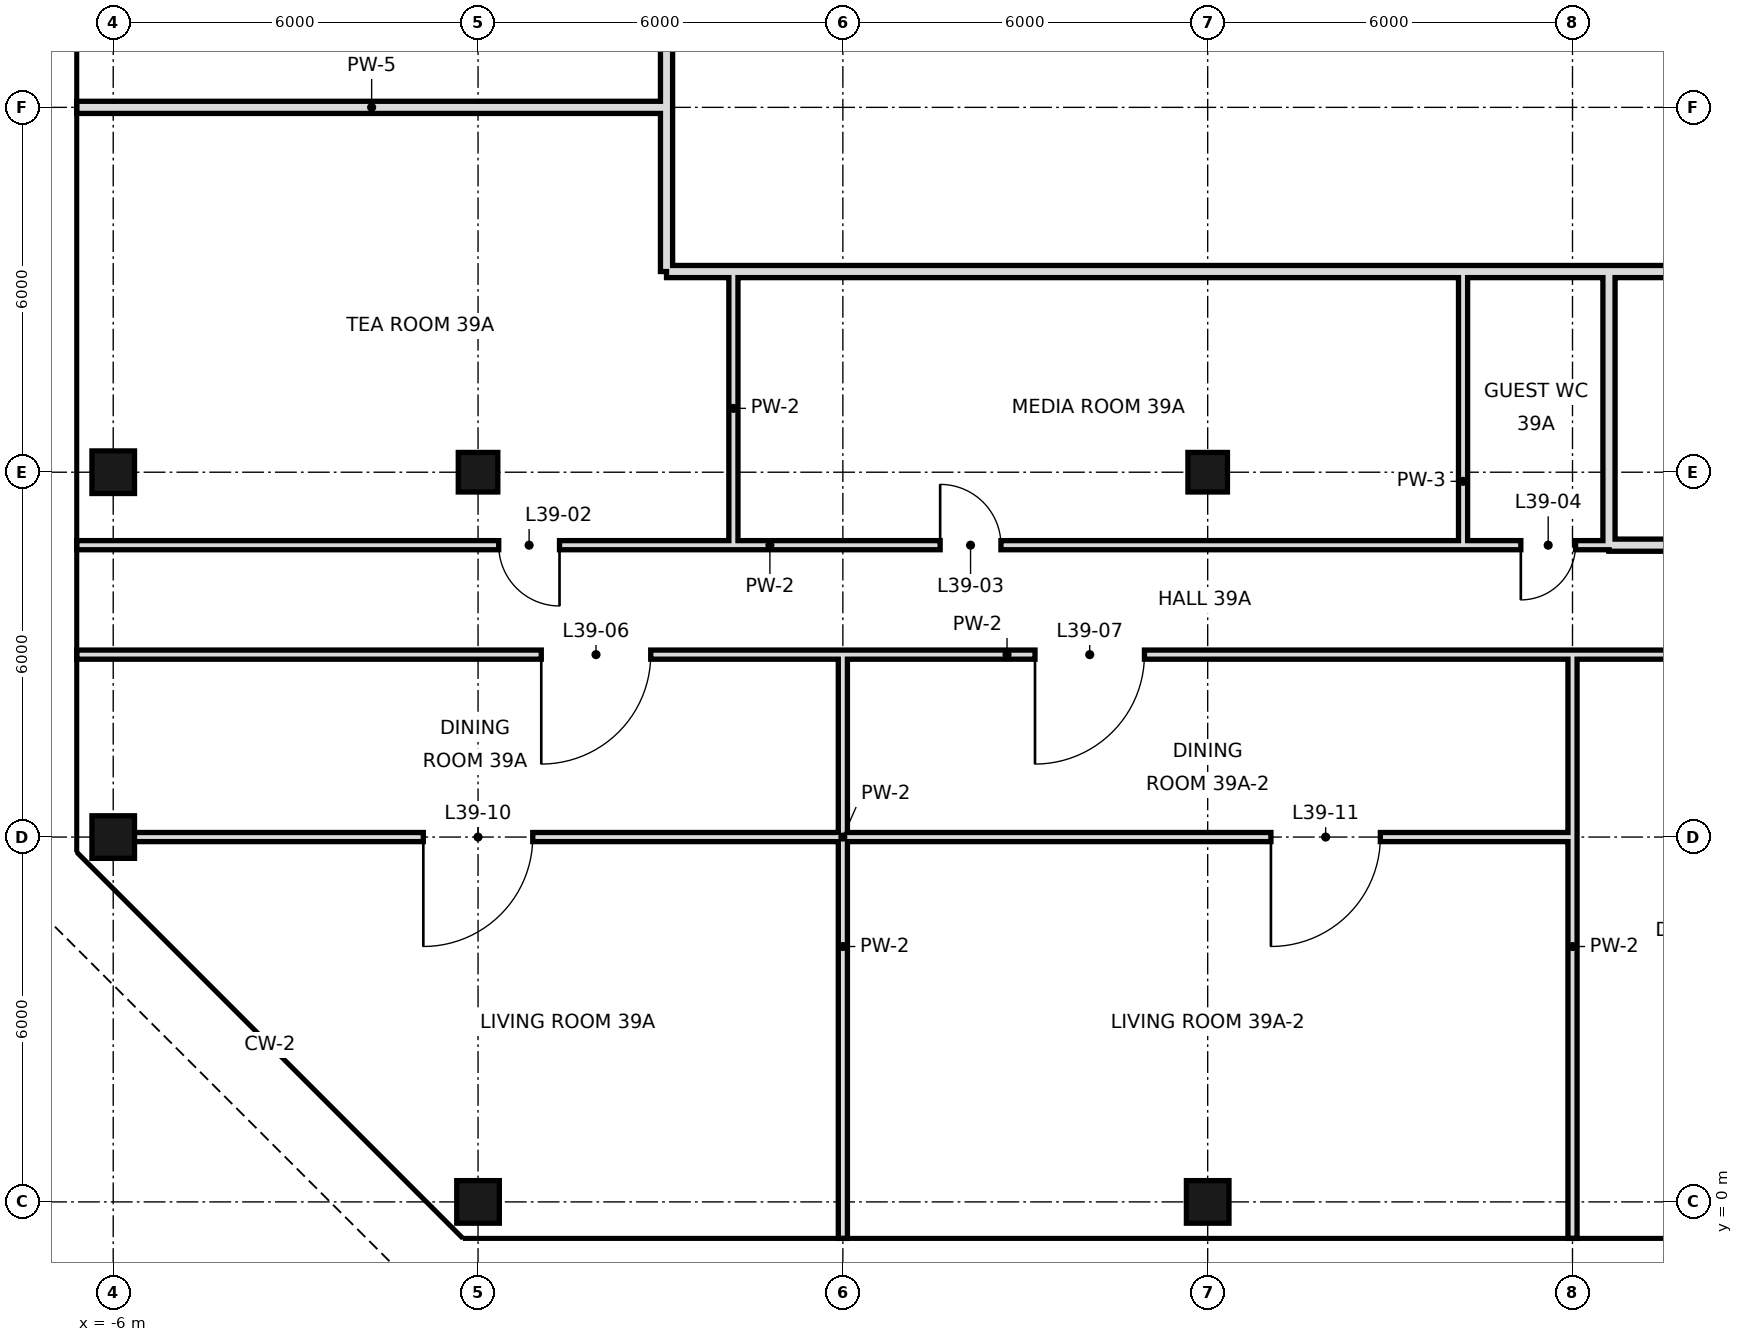
"""IFC4 building model, lengths in metres.
Left out: names, types, materials, properties, quantities, classifications, styles, units other than length and angle.
Written with IfcOpenShell. Run it as: python <this file> out.ifc"""

import sys

from ifc_helpers import new_model, si_unit, direction, frame, frame_2d, origin, origin_2d, place, context, subcontext, project, spatial, rectangle, hollow_rectangle, extrude, element, fill, save


model = new_model("IFC4")
c1 = context("Model", 3, precision=1e-05, world=origin(), true_north=direction((0.0, 1.0)))
c2 = subcontext(c1, "Body", "Model", "MODEL_VIEW")
j1 = project(units=[si_unit("LENGTHUNIT", "METRE"), si_unit("PLANEANGLEUNIT", "RADIAN")], contexts=[c1])
p1 = place(None, origin())
s1 = spatial("IfcSite", under=j1, at=p1, CompositionType="ELEMENT")
p2 = place(p1, origin())
s2 = spatial("IfcBuilding", under=s1, at=p2, CompositionType="ELEMENT")
p3 = place(p2, frame((0.0, 0.0, 170.8)))
s3 = spatial("IfcBuildingStorey", under=s2, at=p3, CompositionType="ELEMENT", Elevation=170.8)
for number, where, z_axis, x_axis in (
    (1, (-6.0, 6.0, 0.0), (0.0, 0.0, 1.0), (1.0, 0.0, 0.0)),
    (2, (-6.0, 12.0, 0.0), (0.0, 0.0, 1.0), (1.0, 0.0, 0.0)),
    (3, (0.0, 0.0, 0.0), (0.0, 0.0, 1.0), (1.0, 0.0, 0.0)),
):
    element("IfcColumn", number, at=place(p3, frame(where, z_axis=z_axis, x_axis=x_axis)), inside=s3, PredefinedType="COLUMN", context=c2, shape_type="SweptSolid", body=[
        extrude(hollow_rectangle(XDim=0.7, YDim=0.7, WallThickness=0.036, at=origin_2d()), origin(), (0.0, 0.0, 1.0), 3.6),
    ])
p4 = place(p3, frame((0.0, 12.0, 0.0), z_axis=(0.0, 0.0, 1.0), x_axis=(1.0, 0.0, 0.0)))
e4 = element("IfcColumn", 4, at=p4, inside=s3, PredefinedType="COLUMN", context=c2, shape_type="SweptSolid", body=[
    extrude(hollow_rectangle(XDim=0.65, YDim=0.65, WallThickness=0.032, at=origin_2d()), origin(), (0.0, 0.0, 1.0), 3.6),
])
p5 = place(p3, frame((12.0, 0.0, 0.0), z_axis=(0.0, 0.0, 1.0), x_axis=(1.0, 0.0, 0.0)))
e5 = element("IfcColumn", 5, at=p5, inside=s3, PredefinedType="COLUMN", context=c2, shape_type="SweptSolid", body=[
    extrude(hollow_rectangle(XDim=0.7, YDim=0.7, WallThickness=0.036, at=origin_2d()), origin(), (0.0, 0.0, 1.0), 3.6),
])
p6 = place(p3, frame((12.0, 12.0, 0.0), z_axis=(0.0, 0.0, 1.0), x_axis=(1.0, 0.0, 0.0)))
e6 = element("IfcColumn", 6, at=p6, inside=s3, PredefinedType="COLUMN", context=c2, shape_type="SweptSolid", body=[
    extrude(hollow_rectangle(XDim=0.65, YDim=0.65, WallThickness=0.032, at=origin_2d()), origin(), (0.0, 0.0, 1.0), 3.6),
])
p7 = place(p3, frame((16.2, 10.8, 0.0), z_axis=(0.0, 0.0, 1.0), x_axis=(0.0, 1.0, 0.0)))
e7 = element("IfcWall", 7, at=p7, inside=s3, PredefinedType="PARTITIONING", context=c2, shape_type="SweptSolid", body=[
    extrude(rectangle(XDim=4.5, YDim=0.15, at=frame_2d((2.25, 0.0))), origin(), (0.0, 0.0, 1.0), 3.42),
])
p8 = place(p3, frame((18.0, -0.6, 0.0), z_axis=(0.0, 0.0, 1.0), x_axis=(0.0, 1.0, 0.0)))
e8 = element("IfcWall", 8, at=p8, inside=s3, PredefinedType="PARTITIONING", context=c2, shape_type="SweptSolid", body=[
    extrude(rectangle(XDim=9.6, YDim=0.15, at=frame_2d((4.8, 0.0))), origin(), (0.0, 0.0, 1.0), 2.72),
])
p9 = place(p3, frame((18.6, 10.8, 0.0), z_axis=(0.0, 0.0, 1.0), x_axis=(0.0, 1.0, 0.0)))
e9 = element("IfcWall", 9, at=p9, inside=s3, PredefinedType="SOLIDWALL", context=c2, shape_type="SweptSolid", body=[
    extrude(rectangle(XDim=4.5, YDim=0.2, at=frame_2d((2.25, 0.0))), origin(), (0.0, 0.0, 1.0), 2.72),
])
p10 = place(p3, frame((3.1, 15.3, 0.0), z_axis=(0.0, 0.0, 1.0), x_axis=(0.0, 1.0, 0.0)))
e10 = element("IfcWall", 10, at=p10, inside=s3, PredefinedType="SOLIDWALL", context=c2, shape_type="SweptSolid", body=[
    extrude(rectangle(XDim=33.3, YDim=0.2, at=frame_2d((16.65, 0.0))), origin(), (0.0, 0.0, 1.0), 2.72),
])
p11 = place(p10, frame((17.1, 0.0, 0.0)))
e11 = element("IfcOpeningElement", 11, at=p11, cuts=e10, PredefinedType="OPENING", context=c2, shape_type="SweptSolid", body=[
    extrude(rectangle(XDim=1.2, YDim=2.4, at=frame_2d((0.6, 1.2))), frame((0.0, 0.11, 0.0), z_axis=(0.0, -1.0, 0.0), x_axis=(1.0, 0.0, 0.0)), (0.0, 0.0, 1.0), 0.22),
])
p12 = place(p3, frame((4.2, 10.8, 0.0), z_axis=(0.0, 0.0, 1.0), x_axis=(0.0, 1.0, 0.0)))
e12 = element("IfcWall", 12, at=p12, inside=s3, PredefinedType="PARTITIONING", context=c2, shape_type="SweptSolid", body=[
    extrude(rectangle(XDim=4.5, YDim=0.15, at=frame_2d((2.25, 0.0))), origin(), (0.0, 0.0, 1.0), 3.42),
])
p13 = place(p3, frame((6.0, -0.6, 0.0), z_axis=(0.0, 0.0, 1.0), x_axis=(0.0, 1.0, 0.0)))
e13 = element("IfcWall", 13, at=p13, inside=s3, PredefinedType="PARTITIONING", context=c2, shape_type="SweptSolid", body=[
    extrude(rectangle(XDim=9.6, YDim=0.15, at=frame_2d((4.8, 0.0))), origin(), (0.0, 0.0, 1.0), 2.72),
])
p14 = place(p3, frame((18.6, 10.8, 0.0), z_axis=(0.0, 0.0, 1.0), x_axis=(1.0, 0.0, 0.0)))
e14 = element("IfcWall", 14, at=p14, inside=s3, PredefinedType="SOLIDWALL", context=c2, shape_type="SweptSolid", body=[
    extrude(rectangle(XDim=5.4, YDim=0.2, at=frame_2d((2.7, 0.0))), origin(), (0.0, 0.0, 1.0), 2.72),
])
p15 = place(p14, frame((2.98, 0.0, 0.0)))
e15 = element("IfcOpeningElement", 15, at=p15, cuts=e14, PredefinedType="OPENING", context=c2, shape_type="SweptSolid", body=[
    extrude(rectangle(XDim=1.0, YDim=2.4, at=frame_2d((0.5, 1.2))), frame((0.0, 0.11, 0.0), z_axis=(0.0, -1.0, 0.0), x_axis=(1.0, 0.0, 0.0)), (0.0, 0.0, 1.0), 0.22),
])
p16 = place(p3, frame((-6.6, 10.8, 0.0), z_axis=(0.0, 0.0, 1.0), x_axis=(1.0, 0.0, 0.0)))
e16 = element("IfcWall", 16, at=p16, inside=s3, PredefinedType="PARTITIONING", context=c2, shape_type="SweptSolid", body=[
    extrude(rectangle(XDim=22.8, YDim=0.15, at=frame_2d((11.4, 0.0))), origin(), (0.0, 0.0, 1.0), 3.42),
])
p17 = place(p16, frame((6.94, 0.0, 0.0)))
e17 = element("IfcOpeningElement", 17, at=p17, cuts=e16, PredefinedType="OPENING", context=c2, shape_type="SweptSolid", body=[
    extrude(rectangle(XDim=1.0, YDim=2.4, at=frame_2d((0.5, 1.2))), frame((0.0, 0.085, 0.0), z_axis=(0.0, -1.0, 0.0), x_axis=(1.0, 0.0, 0.0)), (0.0, 0.0, 1.0), 0.17),
])
p18 = place(p16, frame((14.2, 0.0, 0.0)))
e18 = element("IfcOpeningElement", 18, at=p18, cuts=e16, PredefinedType="OPENING", context=c2, shape_type="SweptSolid", body=[
    extrude(rectangle(XDim=1.0, YDim=2.4, at=frame_2d((0.5, 1.2))), frame((0.0, 0.085, 0.0), z_axis=(0.0, -1.0, 0.0), x_axis=(1.0, 0.0, 0.0)), (0.0, 0.0, 1.0), 0.17),
])
p19 = place(p3, frame((16.2, 10.8, 0.0), z_axis=(0.0, 0.0, 1.0), x_axis=(1.0, 0.0, 0.0)))
e19 = element("IfcWall", 19, at=p19, inside=s3, PredefinedType="PARTITIONING", context=c2, shape_type="SweptSolid", body=[
    extrude(rectangle(XDim=2.4, YDim=0.15, at=frame_2d((1.2, 0.0))), origin(), (0.0, 0.0, 1.0), 3.42),
])
p20 = place(p19, frame((0.95, 0.0, 0.0)))
e20 = element("IfcOpeningElement", 20, at=p20, cuts=e19, PredefinedType="OPENING", context=c2, shape_type="SweptSolid", body=[
    extrude(rectangle(XDim=0.9, YDim=2.4, at=frame_2d((0.45, 1.2))), frame((0.0, 0.085, 0.0), z_axis=(0.0, -1.0, 0.0), x_axis=(1.0, 0.0, 0.0)), (0.0, 0.0, 1.0), 0.17),
])
p21 = place(p3, frame((3.1, 15.3, 0.0), z_axis=(0.0, 0.0, 1.0), x_axis=(1.0, 0.0, 0.0)))
e21 = element("IfcWall", 21, at=p21, inside=s3, PredefinedType="SOLIDWALL", context=c2, shape_type="SweptSolid", body=[
    extrude(rectangle(XDim=15.5, YDim=0.2, at=frame_2d((7.75, 0.0))), origin(), (0.0, 0.0, 1.0), 2.72),
])
p22 = place(p3, frame((18.6, 15.3, 0.0), z_axis=(0.0, 0.0, 1.0), x_axis=(1.0, 0.0, 0.0)))
e22 = element("IfcWall", 22, at=p22, inside=s3, PredefinedType="SOLIDWALL", context=c2, shape_type="SweptSolid", body=[
    extrude(rectangle(XDim=5.4, YDim=0.2, at=frame_2d((2.7, 0.0))), origin(), (0.0, 0.0, 1.0), 3.42),
])
p23 = place(p3, frame((-6.6, 18.0, 0.0), z_axis=(0.0, 0.0, 1.0), x_axis=(1.0, 0.0, 0.0)))
e23 = element("IfcWall", 23, at=p23, inside=s3, PredefinedType="SOLIDWALL", context=c2, shape_type="SweptSolid", body=[
    extrude(rectangle(XDim=9.7, YDim=0.2, at=frame_2d((4.85, 0.0))), origin(), (0.0, 0.0, 1.0), 2.72),
])
p24 = place(p3, frame((-6.0, 6.0, 0.0), z_axis=(0.0, 0.0, 1.0), x_axis=(1.0, 0.0, 0.0)))
e24 = element("IfcWall", 24, at=p24, inside=s3, PredefinedType="PARTITIONING", context=c2, shape_type="SweptSolid", body=[
    extrude(rectangle(XDim=24.0, YDim=0.15, at=frame_2d((12.0, 0.0))), origin(), (0.0, 0.0, 1.0), 2.97),
])
p25 = place(p24, frame((5.1, 0.0, 0.0)))
e25 = element("IfcOpeningElement", 25, at=p25, cuts=e24, PredefinedType="OPENING", context=c2, shape_type="SweptSolid", body=[
    extrude(rectangle(XDim=1.8, YDim=2.4, at=frame_2d((0.9, 1.2))), frame((0.0, 0.085, 0.0), z_axis=(0.0, -1.0, 0.0), x_axis=(1.0, 0.0, 0.0)), (0.0, 0.0, 1.0), 0.17),
])
p26 = place(p24, frame((19.04, 0.0, 0.0)))
e26 = element("IfcOpeningElement", 26, at=p26, cuts=e24, PredefinedType="OPENING", context=c2, shape_type="SweptSolid", body=[
    extrude(rectangle(XDim=1.8, YDim=2.4, at=frame_2d((0.9, 1.2))), frame((0.0, 0.085, 0.0), z_axis=(0.0, -1.0, 0.0), x_axis=(1.0, 0.0, 0.0)), (0.0, 0.0, 1.0), 0.17),
])
p27 = place(p3, frame((-6.6, 9.0, 0.0), z_axis=(0.0, 0.0, 1.0), x_axis=(1.0, 0.0, 0.0)))
e27 = element("IfcWall", 27, at=p27, inside=s3, PredefinedType="PARTITIONING", context=c2, shape_type="SweptSolid", body=[
    extrude(rectangle(XDim=30.6, YDim=0.15, at=frame_2d((15.3, 0.0))), origin(), (0.0, 0.0, 1.0), 3.42),
])
p28 = place(p27, frame((7.64, 0.0, 0.0)))
e28 = element("IfcOpeningElement", 28, at=p28, cuts=e27, PredefinedType="OPENING", context=c2, shape_type="SweptSolid", body=[
    extrude(rectangle(XDim=1.8, YDim=2.4, at=frame_2d((0.9, 1.2))), frame((0.0, 0.085, 0.0), z_axis=(0.0, -1.0, 0.0), x_axis=(1.0, 0.0, 0.0)), (0.0, 0.0, 1.0), 0.17),
])
p29 = place(p27, frame((15.76, 0.0, 0.0)))
e29 = element("IfcOpeningElement", 29, at=p29, cuts=e27, PredefinedType="OPENING", context=c2, shape_type="SweptSolid", body=[
    extrude(rectangle(XDim=1.8, YDim=2.4, at=frame_2d((0.9, 1.2))), frame((0.0, 0.085, 0.0), z_axis=(0.0, -1.0, 0.0), x_axis=(1.0, 0.0, 0.0)), (0.0, 0.0, 1.0), 0.17),
])
p30 = place(p27, frame((27.44, 0.0, 0.0)))
e30 = element("IfcOpeningElement", 30, at=p30, cuts=e27, PredefinedType="OPENING", context=c2, shape_type="SweptSolid", body=[
    extrude(rectangle(XDim=1.8, YDim=2.4, at=frame_2d((0.9, 1.2))), frame((0.0, 0.085, 0.0), z_axis=(0.0, -1.0, 0.0), x_axis=(1.0, 0.0, 0.0)), (0.0, 0.0, 1.0), 0.17),
])
p31 = place(p17, origin())
e31 = element("IfcDoor", 31, at=p31, inside=s3, OperationType="SINGLE_SWING_RIGHT", PredefinedType="DOOR", context=c2, shape_type="SweptSolid", body=[
    extrude(rectangle(XDim=1.0, YDim=2.4, at=frame_2d((0.5, 1.2))), frame((0.0, 0.025, 0.0), z_axis=(0.0, -1.0, 0.0), x_axis=(1.0, 0.0, 0.0)), (0.0, 0.0, 1.0), 0.05),
])
fill(e17, e31)
p32 = place(p18, origin())
e32 = element("IfcDoor", 32, at=p32, inside=s3, OperationType="SINGLE_SWING_LEFT", PredefinedType="DOOR", context=c2, shape_type="SweptSolid", body=[
    extrude(rectangle(XDim=1.0, YDim=2.4, at=frame_2d((0.5, 1.2))), frame((0.0, 0.025, 0.0), z_axis=(0.0, -1.0, 0.0), x_axis=(1.0, 0.0, 0.0)), (0.0, 0.0, 1.0), 0.05),
])
fill(e18, e32)
p33 = place(p20, frame((0.9, 0.0, 0.0), z_axis=(0.0, 0.0, 1.0), x_axis=(-1.0, 0.0, 0.0)))
e33 = element("IfcDoor", 33, at=p33, inside=s3, OperationType="SINGLE_SWING_RIGHT", PredefinedType="DOOR", context=c2, shape_type="SweptSolid", body=[
    extrude(rectangle(XDim=0.9, YDim=2.4, at=frame_2d((0.45, 1.2))), frame((0.0, 0.025, 0.0), z_axis=(0.0, -1.0, 0.0), x_axis=(1.0, 0.0, 0.0)), (0.0, 0.0, 1.0), 0.05),
])
fill(e20, e33)
p34 = place(p28, frame((1.8, 0.0, 0.0), z_axis=(0.0, 0.0, 1.0), x_axis=(-1.0, 0.0, 0.0)))
e34 = element("IfcDoor", 34, at=p34, inside=s3, OperationType="SINGLE_SWING_RIGHT", PredefinedType="DOOR", context=c2, shape_type="SweptSolid", body=[
    extrude(rectangle(XDim=1.8, YDim=2.4, at=frame_2d((0.9, 1.2))), frame((0.0, 0.025, 0.0), z_axis=(0.0, -1.0, 0.0), x_axis=(1.0, 0.0, 0.0)), (0.0, 0.0, 1.0), 0.05),
])
fill(e28, e34)
p35 = place(p29, frame((1.8, 0.0, 0.0), z_axis=(0.0, 0.0, 1.0), x_axis=(-1.0, 0.0, 0.0)))
e35 = element("IfcDoor", 35, at=p35, inside=s3, OperationType="SINGLE_SWING_RIGHT", PredefinedType="DOOR", context=c2, shape_type="SweptSolid", body=[
    extrude(rectangle(XDim=1.8, YDim=2.4, at=frame_2d((0.9, 1.2))), frame((0.0, 0.025, 0.0), z_axis=(0.0, -1.0, 0.0), x_axis=(1.0, 0.0, 0.0)), (0.0, 0.0, 1.0), 0.05),
])
fill(e29, e35)
p36 = place(p25, frame((1.8, 0.0, 0.0), z_axis=(0.0, 0.0, 1.0), x_axis=(-1.0, 0.0, 0.0)))
e36 = element("IfcDoor", 36, at=p36, inside=s3, OperationType="SINGLE_SWING_RIGHT", PredefinedType="DOOR", context=c2, shape_type="SweptSolid", body=[
    extrude(rectangle(XDim=1.8, YDim=2.4, at=frame_2d((0.9, 1.2))), frame((0.0, 0.025, 0.0), z_axis=(0.0, -1.0, 0.0), x_axis=(1.0, 0.0, 0.0)), (0.0, 0.0, 1.0), 0.05),
])
fill(e25, e36)
p37 = place(p26, frame((1.8, 0.0, 0.0), z_axis=(0.0, 0.0, 1.0), x_axis=(-1.0, 0.0, 0.0)))
e37 = element("IfcDoor", 37, at=p37, inside=s3, OperationType="SINGLE_SWING_RIGHT", PredefinedType="DOOR", context=c2, shape_type="SweptSolid", body=[
    extrude(rectangle(XDim=1.8, YDim=2.4, at=frame_2d((0.9, 1.2))), frame((0.0, 0.025, 0.0), z_axis=(0.0, -1.0, 0.0), x_axis=(1.0, 0.0, 0.0)), (0.0, 0.0, 1.0), 0.05),
])
fill(e26, e37)
save(model, sys.argv[1])
